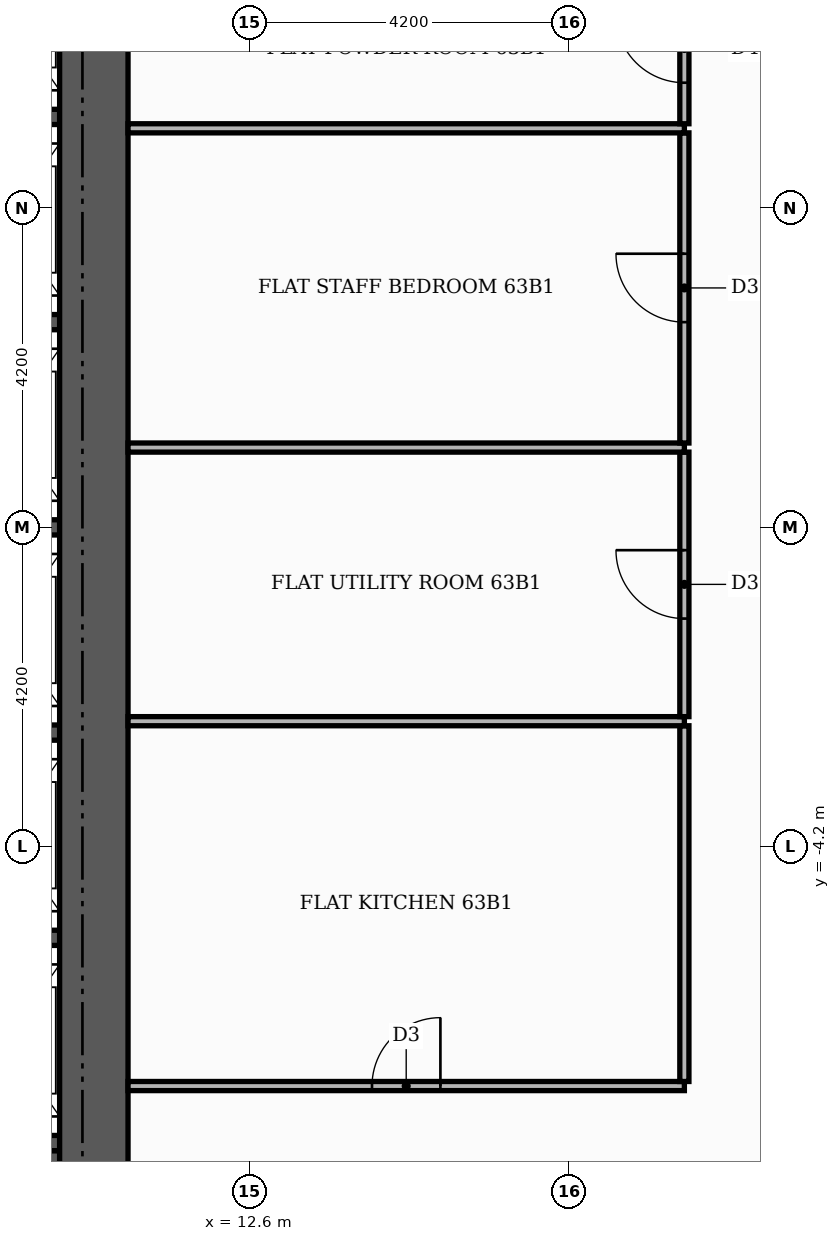
"""IFC4 building model, lengths in metres.
Left out: names, types, materials, properties, quantities, classifications, styles, units other than length and angle.
Written with IfcOpenShell. Run it as: python <this file> out.ifc"""

import sys

from ifc_helpers import new_model, si_unit, direction, frame, frame_2d, origin, place, context, subcontext, project, spatial, rectangle, extrude, element, fill, save


model = new_model("IFC4")
c1 = context("Model", 3, precision=1e-05, world=origin(), true_north=direction((0.0, 1.0)))
c2 = subcontext(c1, "Body", "Model", "MODEL_VIEW")
j1 = project(units=[si_unit("LENGTHUNIT", "METRE"), si_unit("PLANEANGLEUNIT", "RADIAN")], contexts=[c1])
p1 = place(None, origin())
s1 = spatial("IfcSite", under=j1, at=p1, CompositionType="ELEMENT")
p2 = place(p1, origin())
s2 = spatial("IfcBuilding", under=s1, at=p2, CompositionType="ELEMENT")
p3 = place(p2, frame((0.0, 0.0, 264.0)))
s3 = spatial("IfcBuildingStorey", under=s2, at=p3, CompositionType="ELEMENT", Elevation=264.0)
p4 = place(p3, frame((5.5, -9.15, 0.0), z_axis=(0.0, 0.0, 1.0), x_axis=(1.0, 0.0, 0.0)))
e1 = element("IfcWall", 1, at=p4, inside=s3, PredefinedType="SHEAR", context=c2, shape_type="SweptSolid", body=[
    extrude(rectangle(XDim=4.6, YDim=1.9, at=frame_2d((2.3, 0.0))), origin(), (0.0, 0.0, 1.0), 3.48),
])
for number, where, z_axis, x_axis in (
    (2, (8.1, -8.1, 0.0), (0.0, 0.0, 1.0), (1.0, 0.0, 0.0)),
    (3, (8.1, -5.4, 0.0), (0.0, 0.0, 1.0), (1.0, 0.0, 0.0)),
    (4, (8.1, -2.7, 0.0), (0.0, 0.0, 1.0), (1.0, 0.0, 0.0)),
    (5, (8.1, 0.0, 0.0), (0.0, 0.0, 1.0), (1.0, 0.0, 0.0)),
    (6, (8.1, 2.7, 0.0), (0.0, 0.0, 1.0), (1.0, 0.0, 0.0)),
    (7, (8.1, 5.4, 0.0), (0.0, 0.0, 1.0), (1.0, 0.0, 0.0)),
):
    element("IfcWall", number, at=place(p3, frame(where, z_axis=z_axis, x_axis=x_axis)), inside=s3, PredefinedType="SHEAR", context=c2, shape_type="SweptSolid", body=[
        extrude(rectangle(XDim=2.0, YDim=0.2, at=frame_2d((1.0, 0.0))), origin(), (0.0, 0.0, 1.0), 3.48),
    ])
p5 = place(p3, frame((10.55, -10.1, 0.0), z_axis=(0.0, 0.0, 1.0), x_axis=(0.0, 1.0, 0.0)))
e8 = element("IfcWall", 8, at=p5, inside=s3, PredefinedType="SHEAR", context=c2, shape_type="SweptSolid", body=[
    extrude(rectangle(XDim=20.2, YDim=0.9, at=frame_2d((10.1, 0.0))), origin(), (0.0, 0.0, 1.0), 3.48),
])
p6 = place(p3, frame((11.0, -7.35, 0.0), z_axis=(0.0, 0.0, 1.0), x_axis=(1.0, 0.0, 0.0)))
e9 = element("IfcWall", 9, at=p6, inside=s3, PredefinedType="PARTITIONING", context=c2, shape_type="SweptSolid", body=[
    extrude(rectangle(XDim=7.32, YDim=0.12, at=frame_2d((3.66, 0.0))), origin(), (0.0, 0.0, 1.0), 3.48),
])
p7 = place(p6, frame((3.21, 0.0, 0.0)))
e10 = element("IfcOpeningElement", 10, at=p7, cuts=e9, PredefinedType="OPENING", context=c2, shape_type="SweptSolid", body=[
    extrude(rectangle(XDim=0.9, YDim=2.1, at=frame_2d((0.45, 1.05))), frame((0.0, 0.07, 0.0), z_axis=(0.0, -1.0, 0.0), x_axis=(1.0, 0.0, 0.0)), (0.0, 0.0, 1.0), 0.14),
])
p8 = place(p3, frame((18.32, -7.29, 0.0), z_axis=(0.0, 0.0, 1.0), x_axis=(0.0, 1.0, 0.0)))
e11 = element("IfcWall", 11, at=p8, inside=s3, PredefinedType="PARTITIONING", context=c2, shape_type="SweptSolid", body=[
    extrude(rectangle(XDim=4.68, YDim=0.12, at=frame_2d((2.34, 0.0))), origin(), (0.0, 0.0, 1.0), 3.48),
])
p9 = place(p3, frame((11.0, -2.55, 0.0), z_axis=(0.0, 0.0, 1.0), x_axis=(1.0, 0.0, 0.0)))
e12 = element("IfcWall", 12, at=p9, inside=s3, PredefinedType="PARTITIONING", context=c2, shape_type="SweptSolid", body=[
    extrude(rectangle(XDim=7.32, YDim=0.12, at=frame_2d((3.66, 0.0))), origin(), (0.0, 0.0, 1.0), 3.48),
])
p10 = place(p3, frame((18.32, -2.49, 0.0), z_axis=(0.0, 0.0, 1.0), x_axis=(0.0, 1.0, 0.0)))
e13 = element("IfcWall", 13, at=p10, inside=s3, PredefinedType="PARTITIONING", context=c2, shape_type="SweptSolid", body=[
    extrude(rectangle(XDim=3.48, YDim=0.12, at=frame_2d((1.74, 0.0))), origin(), (0.0, 0.0, 1.0), 3.48),
])
p11 = place(p10, frame((1.29, 0.0, 0.0)))
e14 = element("IfcOpeningElement", 14, at=p11, cuts=e13, PredefinedType="OPENING", context=c2, shape_type="SweptSolid", body=[
    extrude(rectangle(XDim=0.9, YDim=2.1, at=frame_2d((0.45, 1.05))), frame((0.0, 0.07, 0.0), z_axis=(0.0, -1.0, 0.0), x_axis=(1.0, 0.0, 0.0)), (0.0, 0.0, 1.0), 0.14),
])
p12 = place(p3, frame((11.0, 1.05, 0.0), z_axis=(0.0, 0.0, 1.0), x_axis=(1.0, 0.0, 0.0)))
e15 = element("IfcWall", 15, at=p12, inside=s3, PredefinedType="PARTITIONING", context=c2, shape_type="SweptSolid", body=[
    extrude(rectangle(XDim=7.32, YDim=0.12, at=frame_2d((3.66, 0.0))), origin(), (0.0, 0.0, 1.0), 3.48),
])
p13 = place(p3, frame((18.32, 1.11, 0.0), z_axis=(0.0, 0.0, 1.0), x_axis=(0.0, 1.0, 0.0)))
e16 = element("IfcWall", 16, at=p13, inside=s3, PredefinedType="PARTITIONING", context=c2, shape_type="SweptSolid", body=[
    extrude(rectangle(XDim=4.08, YDim=0.12, at=frame_2d((2.04, 0.0))), origin(), (0.0, 0.0, 1.0), 3.48),
])
p14 = place(p13, frame((1.59, 0.0, 0.0)))
e17 = element("IfcOpeningElement", 17, at=p14, cuts=e16, PredefinedType="OPENING", context=c2, shape_type="SweptSolid", body=[
    extrude(rectangle(XDim=0.9, YDim=2.1, at=frame_2d((0.45, 1.05))), frame((0.0, 0.07, 0.0), z_axis=(0.0, -1.0, 0.0), x_axis=(1.0, 0.0, 0.0)), (0.0, 0.0, 1.0), 0.14),
])
p15 = place(p3, frame((11.0, 5.25, 0.0), z_axis=(0.0, 0.0, 1.0), x_axis=(1.0, 0.0, 0.0)))
e18 = element("IfcWall", 18, at=p15, inside=s3, PredefinedType="PARTITIONING", context=c2, shape_type="SweptSolid", body=[
    extrude(rectangle(XDim=7.32, YDim=0.12, at=frame_2d((3.66, 0.0))), origin(), (0.0, 0.0, 1.0), 3.48),
])
p16 = place(p3, frame((18.32, 5.31, 0.0), z_axis=(0.0, 0.0, 1.0), x_axis=(0.0, 1.0, 0.0)))
e19 = element("IfcWall", 19, at=p16, inside=s3, PredefinedType="PARTITIONING", context=c2, shape_type="SweptSolid", body=[
    extrude(rectangle(XDim=1.98, YDim=0.12, at=frame_2d((0.99, 0.0))), origin(), (0.0, 0.0, 1.0), 3.48),
])
p17 = place(p16, frame((0.54, 0.0, 0.0)))
e20 = element("IfcOpeningElement", 20, at=p17, cuts=e19, PredefinedType="OPENING", context=c2, shape_type="SweptSolid", body=[
    extrude(rectangle(XDim=0.9, YDim=2.1, at=frame_2d((0.45, 1.05))), frame((0.0, 0.07, 0.0), z_axis=(0.0, -1.0, 0.0), x_axis=(1.0, 0.0, 0.0)), (0.0, 0.0, 1.0), 0.14),
])
p18 = place(p7, origin())
e21 = element("IfcDoor", 21, at=p18, inside=s3, OperationType="SINGLE_SWING_RIGHT", PredefinedType="DOOR", context=c2, shape_type="SweptSolid", body=[
    extrude(rectangle(XDim=0.9, YDim=2.1, at=frame_2d((0.45, 1.05))), frame((0.0, 0.025, 0.0), z_axis=(0.0, -1.0, 0.0), x_axis=(1.0, 0.0, 0.0)), (0.0, 0.0, 1.0), 0.05),
])
fill(e10, e21)
p19 = place(p11, origin())
e22 = element("IfcDoor", 22, at=p19, inside=s3, OperationType="SINGLE_SWING_RIGHT", PredefinedType="DOOR", context=c2, shape_type="SweptSolid", body=[
    extrude(rectangle(XDim=0.9, YDim=2.1, at=frame_2d((0.45, 1.05))), frame((0.0, 0.025, 0.0), z_axis=(0.0, -1.0, 0.0), x_axis=(1.0, 0.0, 0.0)), (0.0, 0.0, 1.0), 0.05),
])
fill(e14, e22)
p20 = place(p14, origin())
e23 = element("IfcDoor", 23, at=p20, inside=s3, OperationType="SINGLE_SWING_RIGHT", PredefinedType="DOOR", context=c2, shape_type="SweptSolid", body=[
    extrude(rectangle(XDim=0.9, YDim=2.1, at=frame_2d((0.45, 1.05))), frame((0.0, 0.025, 0.0), z_axis=(0.0, -1.0, 0.0), x_axis=(1.0, 0.0, 0.0)), (0.0, 0.0, 1.0), 0.05),
])
fill(e17, e23)
p21 = place(p17, origin())
e24 = element("IfcDoor", 24, at=p21, inside=s3, OperationType="SINGLE_SWING_RIGHT", PredefinedType="DOOR", context=c2, shape_type="SweptSolid", body=[
    extrude(rectangle(XDim=0.9, YDim=2.1, at=frame_2d((0.45, 1.05))), frame((0.0, 0.025, 0.0), z_axis=(0.0, -1.0, 0.0), x_axis=(1.0, 0.0, 0.0)), (0.0, 0.0, 1.0), 0.05),
])
fill(e20, e24)
save(model, sys.argv[1])
